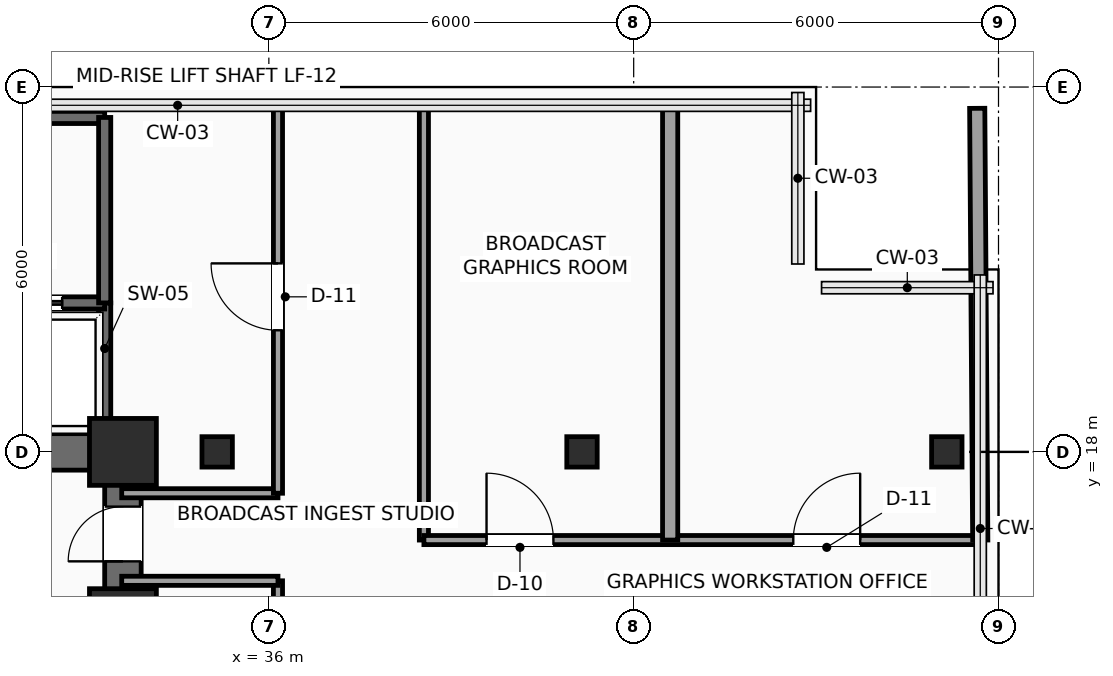
"""IFC4 building model, lengths in metres.
Left out: names, types, materials, properties, quantities, classifications, styles, units other than length and angle.
Written with IfcOpenShell. Run it as: python <this file> out.ifc"""

import sys

from ifc_helpers import new_model, si_unit, direction, frame, frame_2d, origin, origin_2d, place, context, subcontext, project, spatial, rectangle, hollow_rectangle, extrude, element, fill, save


model = new_model("IFC4")
c1 = context("Model", 3, precision=1e-05, world=origin(), true_north=direction((0.0, 1.0)))
c2 = subcontext(c1, "Body", "Model", "MODEL_VIEW")
j1 = project(units=[si_unit("LENGTHUNIT", "METRE"), si_unit("PLANEANGLEUNIT", "RADIAN")], contexts=[c1])
p1 = place(None, origin())
s1 = spatial("IfcSite", under=j1, at=p1, CompositionType="ELEMENT")
p2 = place(p1, origin())
s2 = spatial("IfcBuilding", under=s1, at=p2, CompositionType="ELEMENT")
p3 = place(p2, frame((0.0, 0.0, 126.9)))
s3 = spatial("IfcBuildingStorey", under=s2, at=p3, CompositionType="ELEMENT", Elevation=126.9)
for number, where, z_axis, x_axis in (
    (1, (33.6, 15.2, 0.0), (0.0, 0.0, 1.0), (1.0, 0.0, 0.0)),
    (2, (33.6, 18.0, 0.0), (0.0, 0.0, 1.0), (1.0, 0.0, 0.0)),
):
    element("IfcColumn", number, at=place(p3, frame(where, z_axis=z_axis, x_axis=x_axis)), inside=s3, PredefinedType="COLUMN", context=c2, shape_type="SweptSolid", body=[
        extrude(rectangle(XDim=1.1, YDim=1.1, at=origin_2d()), origin(), (0.0, 0.0, 1.0), 3.75),
    ])
for number, where, z_axis, x_axis in (
    (3, (35.15, 18.0, 0.0), (0.0, 0.0, 1.0), (1.0, 0.0, 0.0)),
    (4, (41.15, 18.0, 0.0), (0.0, 0.0, 1.0), (1.0, 0.0, 0.0)),
    (5, (47.15, 18.0, 0.0), (0.0, 0.0, 1.0), (1.0, 0.0, 0.0)),
):
    element("IfcColumn", number, at=place(p3, frame(where, z_axis=z_axis, x_axis=x_axis)), inside=s3, PredefinedType="COLUMN", context=c2, shape_type="SweptSolid", body=[
        extrude(hollow_rectangle(XDim=0.5, YDim=0.5, WallThickness=0.025, InnerFilletRadius=0.025, OuterFilletRadius=0.04, at=origin_2d()), origin(), (0.0, 0.0, 1.0), 3.75),
    ])
p4 = place(p3, frame((24.0, 18.0, 0.0), z_axis=(0.0, 0.0, 1.0), x_axis=(1.0, 0.0, 0.0)))
e6 = element("IfcWall", 6, at=p4, inside=s3, PredefinedType="SHEAR", context=c2, shape_type="SweptSolid", body=[
    extrude(rectangle(XDim=9.6, YDim=0.6, at=frame_2d((4.8, 0.0))), origin(), (0.0, 0.0, 1.0), 3.525),
])
p5 = place(p3, frame((33.6, 6.0, 0.0), z_axis=(0.0, 0.0, 1.0), x_axis=(0.0, 1.0, 0.0)))
e7 = element("IfcWall", 7, at=p5, inside=s3, PredefinedType="SHEAR", context=c2, shape_type="SweptSolid", body=[
    extrude(rectangle(XDim=12.0, YDim=0.6, at=frame_2d((6.0, 0.0))), origin(), (0.0, 0.0, 1.0), 3.525),
])
p6 = place(p5, frame((10.2, 0.0, 0.0)))
e8 = element("IfcOpeningElement", 8, at=p6, cuts=e7, PredefinedType="OPENING", context=c2, shape_type="SweptSolid", body=[
    extrude(rectangle(XDim=0.9, YDim=2.15, at=frame_2d((0.45, 1.075))), frame((0.0, 0.31, 0.0), z_axis=(0.0, -1.0, 0.0), x_axis=(1.0, 0.0, 0.0)), (0.0, 0.0, 1.0), 0.62),
])
p7 = place(p3, frame((33.3, 18.1, 0.0), z_axis=(0.0, 0.0, 1.0), x_axis=(0.0, 1.0, 0.0)))
e9 = element("IfcWall", 9, at=p7, inside=s3, PredefinedType="SHEAR", context=c2, shape_type="SweptSolid", body=[
    extrude(rectangle(XDim=2.35, YDim=0.2, at=frame_2d((1.175, 0.0))), origin(), (0.0, 0.0, 1.0), 3.525),
])
p8 = place(p3, frame((24.25, 20.45, 0.0), z_axis=(0.0, 0.0, 1.0), x_axis=(1.0, 0.0, 0.0)))
e10 = element("IfcWall", 10, at=p8, inside=s3, PredefinedType="SHEAR", context=c2, shape_type="SweptSolid", body=[
    extrude(rectangle(XDim=9.05, YDim=0.2, at=frame_2d((4.525, 0.0))), origin(), (0.0, 0.0, 1.0), 3.525),
])
p9 = place(p8, frame((0.4, 0.0, 0.0)))
e11 = element("IfcOpeningElement", 11, at=p9, cuts=e10, PredefinedType="OPENING", context=c2, shape_type="SweptSolid", body=[
    extrude(rectangle(XDim=1.2, YDim=2.2, at=frame_2d((0.6, 1.1))), frame((0.0, 0.11, 0.0), z_axis=(0.0, -1.0, 0.0), x_axis=(1.0, 0.0, 0.0)), (0.0, 0.0, 1.0), 0.22),
])
p10 = place(p8, frame((2.65, 0.0, 0.0)))
e12 = element("IfcOpeningElement", 12, at=p10, cuts=e10, PredefinedType="OPENING", context=c2, shape_type="SweptSolid", body=[
    extrude(rectangle(XDim=1.2, YDim=2.2, at=frame_2d((0.6, 1.1))), frame((0.0, 0.11, 0.0), z_axis=(0.0, -1.0, 0.0), x_axis=(1.0, 0.0, 0.0)), (0.0, 0.0, 1.0), 0.22),
])
p11 = place(p8, frame((4.9, 0.0, 0.0)))
e13 = element("IfcOpeningElement", 13, at=p11, cuts=e10, PredefinedType="OPENING", context=c2, shape_type="SweptSolid", body=[
    extrude(rectangle(XDim=1.2, YDim=2.2, at=frame_2d((0.6, 1.1))), frame((0.0, 0.11, 0.0), z_axis=(0.0, -1.0, 0.0), x_axis=(1.0, 0.0, 0.0)), (0.0, 0.0, 1.0), 0.22),
])
p12 = place(p8, frame((7.15, 0.0, 0.0)))
e14 = element("IfcOpeningElement", 14, at=p12, cuts=e10, PredefinedType="OPENING", context=c2, shape_type="SweptSolid", body=[
    extrude(rectangle(XDim=1.2, YDim=2.2, at=frame_2d((0.6, 1.1))), frame((0.0, 0.11, 0.0), z_axis=(0.0, -1.0, 0.0), x_axis=(1.0, 0.0, 0.0)), (0.0, 0.0, 1.0), 0.22),
])
p13 = place(p3, frame((24.15, 23.5, 0.0), z_axis=(0.0, 0.0, 1.0), x_axis=(1.0, 0.0, 0.0)))
e15 = element("IfcWall", 15, at=p13, inside=s3, PredefinedType="SHEAR", context=c2, shape_type="SweptSolid", body=[
    extrude(rectangle(XDim=9.15, YDim=0.2, at=frame_2d((4.575, 0.0))), origin(), (0.0, 0.0, 1.0), 3.525),
])
p14 = place(p3, frame((33.3, 20.45, 0.0), z_axis=(0.0, 0.0, 1.0), x_axis=(0.0, 1.0, 0.0)))
e16 = element("IfcWall", 16, at=p14, inside=s3, PredefinedType="SHEAR", context=c2, shape_type="SweptSolid", body=[
    extrude(rectangle(XDim=3.05, YDim=0.2, at=frame_2d((1.525, 0.0))), origin(), (0.0, 0.0, 1.0), 3.525),
])
p15 = place(p3, frame((36.15, 5.8, 0.0), z_axis=(0.0, 0.0, 1.0), x_axis=(0.0, 1.0, 0.0)))
e17 = element("IfcWall", 17, at=p15, inside=s3, PredefinedType="PARTITIONING", context=c2, shape_type="SweptSolid", body=[
    extrude(rectangle(XDim=10.08, YDim=0.15, at=frame_2d((5.04, 0.0))), origin(), (0.0, 0.0, 1.0), 3.525),
])
p16 = place(p15, frame((2.0, 0.0, 0.0)))
e18 = element("IfcOpeningElement", 18, at=p16, cuts=e17, PredefinedType="OPENING", context=c2, shape_type="SweptSolid", body=[
    extrude(rectangle(XDim=1.1, YDim=2.25, at=frame_2d((0.55, 1.125))), frame((0.0, 0.085, 0.0), z_axis=(0.0, -1.0, 0.0), x_axis=(1.0, 0.0, 0.0)), (0.0, 0.0, 1.0), 0.17),
])
p17 = place(p15, frame((7.04, 0.0, 0.0)))
e19 = element("IfcOpeningElement", 19, at=p17, cuts=e17, PredefinedType="OPENING", context=c2, shape_type="SweptSolid", body=[
    extrude(rectangle(XDim=1.1, YDim=2.25, at=frame_2d((0.55, 1.125))), frame((0.0, 0.085, 0.0), z_axis=(0.0, -1.0, 0.0), x_axis=(1.0, 0.0, 0.0)), (0.0, 0.0, 1.0), 0.17),
])
for number, where, z_axis, x_axis in (
    (20, (36.15, 15.88, 0.0), (0.0, 0.0, 1.0), (-1.0, 0.0, 0.0)),
    (21, (33.58, 17.32, 0.0), (0.0, 0.0, 1.0), (1.0, 0.0, 0.0)),
):
    element("IfcWall", number, at=place(p3, frame(where, z_axis=z_axis, x_axis=x_axis)), inside=s3, PredefinedType="PARTITIONING", context=c2, shape_type="SweptSolid", body=[
        extrude(rectangle(XDim=2.57, YDim=0.15, at=frame_2d((1.285, 0.0))), origin(), (0.0, 0.0, 1.0), 3.525),
    ])
p18 = place(p3, frame((36.15, 17.32, 0.0), z_axis=(0.0, 0.0, 1.0), x_axis=(0.0, 1.0, 0.0)))
e22 = element("IfcWall", 22, at=p18, inside=s3, PredefinedType="PARTITIONING", context=c2, shape_type="SweptSolid", body=[
    extrude(rectangle(XDim=6.38, YDim=0.15, at=frame_2d((3.19, 0.0))), origin(), (0.0, 0.0, 1.0), 3.525),
])
p19 = place(p18, frame((2.68, 0.0, 0.0)))
e23 = element("IfcOpeningElement", 23, at=p19, cuts=e22, PredefinedType="OPENING", context=c2, shape_type="SweptSolid", body=[
    extrude(rectangle(XDim=1.1, YDim=2.25, at=frame_2d((0.55, 1.125))), frame((0.0, 0.085, 0.0), z_axis=(0.0, -1.0, 0.0), x_axis=(1.0, 0.0, 0.0)), (0.0, 0.0, 1.0), 0.17),
])
p20 = place(p3, frame((38.55, 23.7, 0.0), z_axis=(0.0, 0.0, 1.0), x_axis=(0.0, -1.0, 0.0)))
e24 = element("IfcWall", 24, at=p20, inside=s3, PredefinedType="PARTITIONING", context=c2, shape_type="SweptSolid", body=[
    extrude(rectangle(XDim=7.15, YDim=0.15, at=frame_2d((3.575, 0.0))), origin(), (0.0, 0.0, 1.0), 3.525),
])
p21 = place(p3, frame((38.55, 16.55, 0.0), z_axis=(0.0, 0.0, 1.0), x_axis=(1.0, 0.0, 0.0)))
e25 = element("IfcWall", 25, at=p21, inside=s3, PredefinedType="PARTITIONING", context=c2, shape_type="SweptSolid", body=[
    extrude(rectangle(XDim=9.15, YDim=0.15, at=frame_2d((4.575, 0.0))), origin(), (0.0, 0.0, 1.0), 3.525),
])
p22 = place(p21, frame((1.03, 0.0, 0.0)))
e26 = element("IfcOpeningElement", 26, at=p22, cuts=e25, PredefinedType="OPENING", context=c2, shape_type="SweptSolid", body=[
    extrude(rectangle(XDim=1.1, YDim=2.25, at=frame_2d((0.55, 1.125))), frame((0.0, 0.085, 0.0), z_axis=(0.0, -1.0, 0.0), x_axis=(1.0, 0.0, 0.0)), (0.0, 0.0, 1.0), 0.17),
])
p23 = place(p21, frame((6.075, 0.0, 0.0)))
e27 = element("IfcOpeningElement", 27, at=p23, cuts=e25, PredefinedType="OPENING", context=c2, shape_type="SweptSolid", body=[
    extrude(rectangle(XDim=1.1, YDim=2.25, at=frame_2d((0.55, 1.125))), frame((0.0, 0.085, 0.0), z_axis=(0.0, -1.0, 0.0), x_axis=(1.0, 0.0, 0.0)), (0.0, 0.0, 1.0), 0.17),
])
p24 = place(p3, frame((42.6, 16.55, 0.0), z_axis=(0.0, 0.0, 1.0), x_axis=(0.0, 1.0, 0.0)))
e28 = element("IfcWall", 28, at=p24, inside=s3, PredefinedType="PARTITIONING", context=c2, shape_type="SweptSolid", body=[
    extrude(rectangle(XDim=7.15, YDim=0.25, at=frame_2d((3.575, 0.0))), origin(), (0.0, 0.0, 1.0), 3.525),
])
p25 = place(p3, frame((47.7, 16.55, 0.0), z_axis=(0.0, 0.0, 1.0), x_axis=(-0.007049101019, 0.999975154779, 0.0)))
e29 = element("IfcWall", 29, at=p25, inside=s3, PredefinedType="PARTITIONING", context=c2, shape_type="SweptSolid", body=[
    extrude(rectangle(XDim=7.1, YDim=0.25, at=frame_2d((3.55, 0.0))), origin(), (0.0, 0.0, 1.0), 3.525),
])
p26 = place(p6, origin())
e30 = element("IfcDoor", 30, at=p26, inside=s3, OperationType="SINGLE_SWING_LEFT", PredefinedType="DOOR", context=c2, shape_type="SweptSolid", body=[
    extrude(rectangle(XDim=0.9, YDim=2.15, at=frame_2d((0.45, 1.075))), frame((0.0, 0.025, 0.0), z_axis=(0.0, -1.0, 0.0), x_axis=(1.0, 0.0, 0.0)), (0.0, 0.0, 1.0), 0.05),
])
fill(e8, e30)
p27 = place(p12, origin())
e31 = element("IfcDoor", 31, at=p27, inside=s3, OperationType="SLIDING_TO_RIGHT", PredefinedType="DOOR", context=c2, shape_type="SweptSolid", body=[
    extrude(rectangle(XDim=1.2, YDim=2.2, at=frame_2d((0.6, 1.1))), frame((0.0, 0.025, 0.0), z_axis=(0.0, -1.0, 0.0), x_axis=(1.0, 0.0, 0.0)), (0.0, 0.0, 1.0), 0.05),
])
fill(e14, e31)
p28 = place(p19, origin())
e32 = element("IfcDoor", 32, at=p28, inside=s3, OperationType="SINGLE_SWING_RIGHT", PredefinedType="DOOR", context=c2, shape_type="SweptSolid", body=[
    extrude(rectangle(XDim=1.1, YDim=2.25, at=frame_2d((0.55, 1.125))), frame((0.0, 0.025, 0.0), z_axis=(0.0, -1.0, 0.0), x_axis=(1.0, 0.0, 0.0)), (0.0, 0.0, 1.0), 0.05),
])
fill(e23, e32)
p29 = place(p22, origin())
e33 = element("IfcDoor", 33, at=p29, inside=s3, OperationType="SINGLE_SWING_LEFT", PredefinedType="DOOR", context=c2, shape_type="SweptSolid", body=[
    extrude(rectangle(XDim=1.1, YDim=2.25, at=frame_2d((0.55, 1.125))), frame((0.0, 0.025, 0.0), z_axis=(0.0, -1.0, 0.0), x_axis=(1.0, 0.0, 0.0)), (0.0, 0.0, 1.0), 0.05),
])
fill(e26, e33)
p30 = place(p23, origin())
e34 = element("IfcDoor", 34, at=p30, inside=s3, OperationType="SINGLE_SWING_RIGHT", PredefinedType="DOOR", context=c2, shape_type="SweptSolid", body=[
    extrude(rectangle(XDim=1.1, YDim=2.25, at=frame_2d((0.55, 1.125))), frame((0.0, 0.025, 0.0), z_axis=(0.0, -1.0, 0.0), x_axis=(1.0, 0.0, 0.0)), (0.0, 0.0, 1.0), 0.05),
])
fill(e27, e34)
save(model, sys.argv[1])
